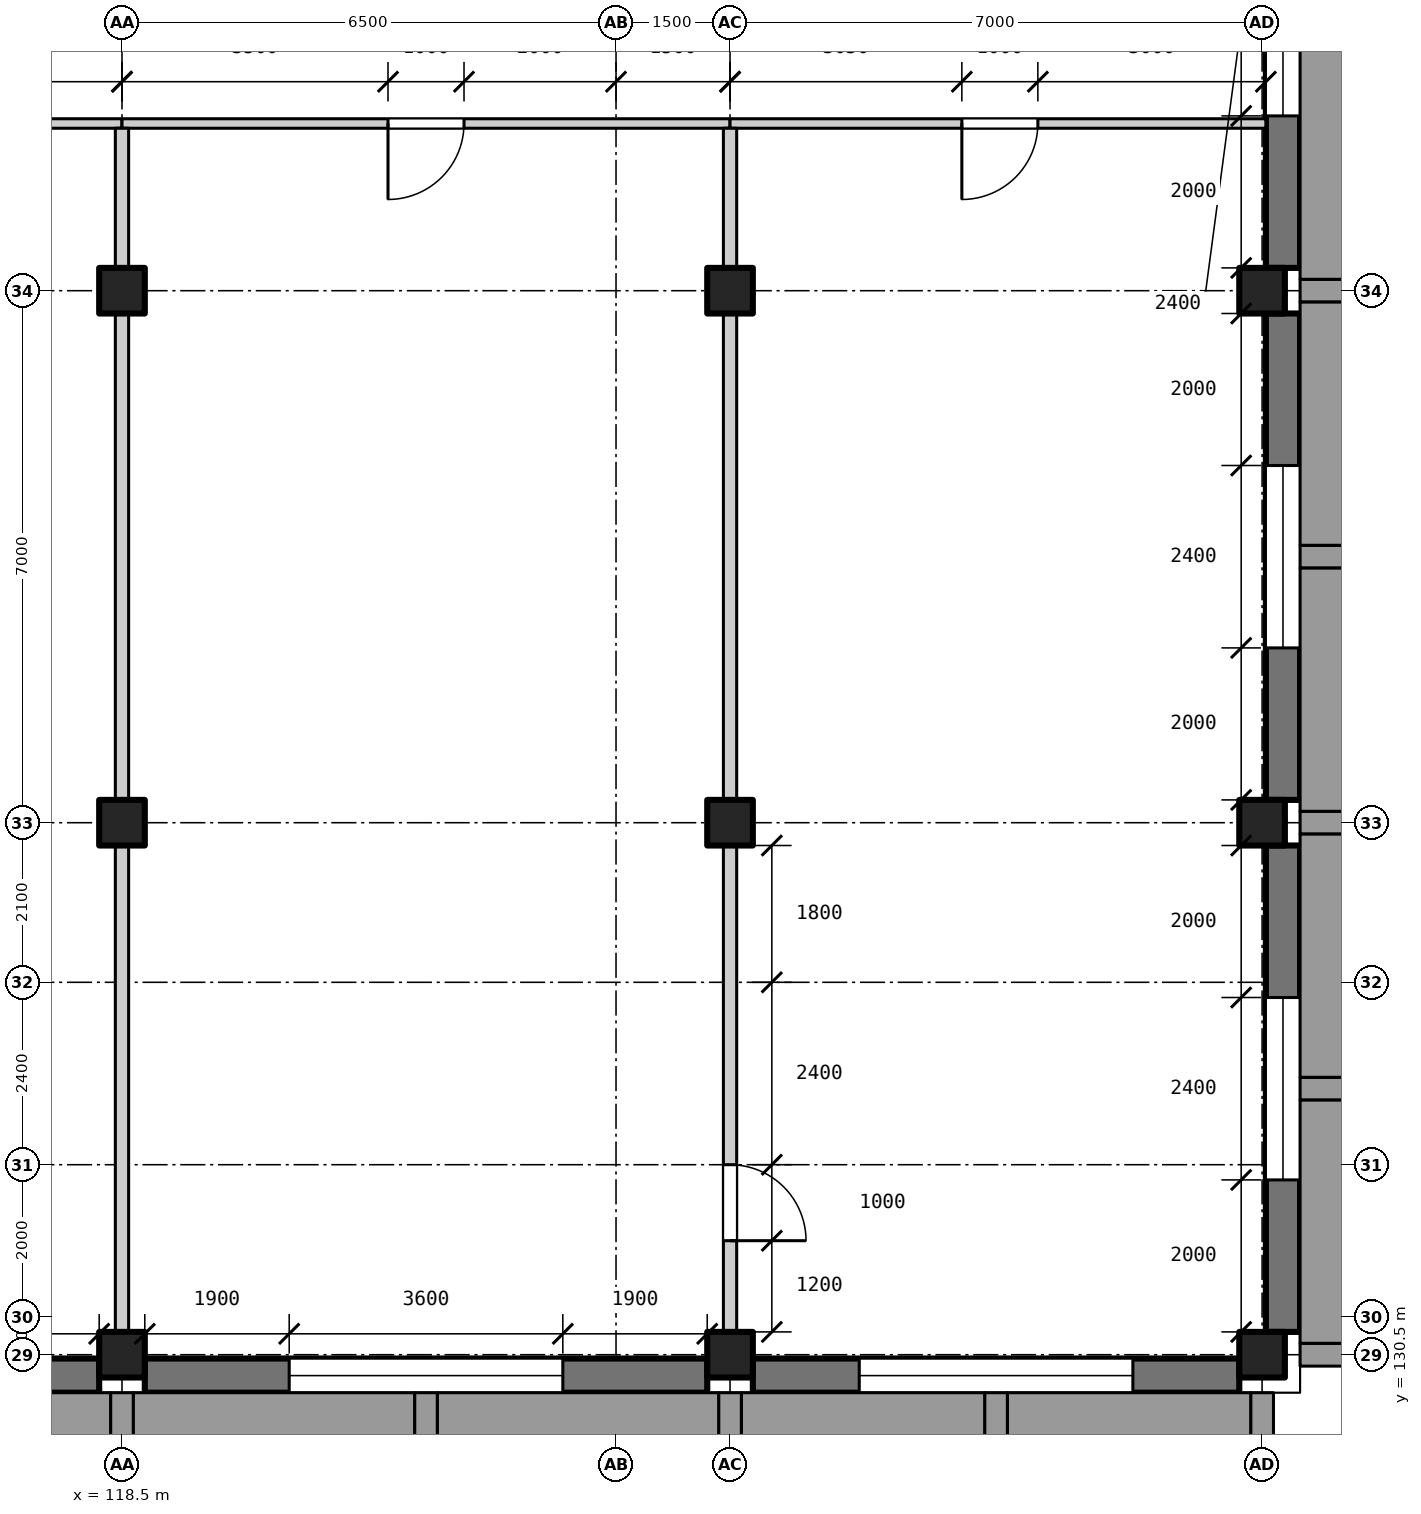
"""IFC4 building model, lengths in metres.
Left out: names, types, materials, properties, quantities, classifications, styles, units other than length and angle.
Written with IfcOpenShell. Run it as: python <this file> out.ifc"""

import sys

from ifc_helpers import new_model, si_unit, direction, frame, frame_2d, origin, origin_2d, place, context, subcontext, project, spatial, rectangle, extrude, element, fill, save


model = new_model("IFC4")
c1 = context("Model", 3, precision=1e-05, world=origin(), true_north=direction((0.0, 1.0)))
c2 = subcontext(c1, "Body", "Model", "MODEL_VIEW")
j1 = project(units=[si_unit("LENGTHUNIT", "METRE"), si_unit("PLANEANGLEUNIT", "RADIAN")], contexts=[c1])
p1 = place(None, origin())
s1 = spatial("IfcSite", under=j1, at=p1, CompositionType="ELEMENT")
p2 = place(p1, origin())
s2 = spatial("IfcBuilding", under=s1, at=p2, CompositionType="ELEMENT")
p3 = place(p2, frame((0.0, 0.0, 14.4)))
s3 = spatial("IfcBuildingStorey", under=s2, at=p3, CompositionType="ELEMENT", Elevation=14.4)
for number, where, z_axis, x_axis in (
    (1, (118.5, 130.5, 0.0), (0.0, 0.0, 1.0), (1.0, 0.0, 0.0)),
    (2, (118.5, 137.5, 0.0), (0.0, 0.0, 1.0), (1.0, 0.0, 0.0)),
    (3, (118.5, 144.5, 0.0), (0.0, 0.0, 1.0), (1.0, 0.0, 0.0)),
    (4, (126.5, 130.5, 0.0), (0.0, 0.0, 1.0), (1.0, 0.0, 0.0)),
    (5, (126.5, 137.5, 0.0), (0.0, 0.0, 1.0), (1.0, 0.0, 0.0)),
    (6, (126.5, 144.5, 0.0), (0.0, 0.0, 1.0), (1.0, 0.0, 0.0)),
    (7, (133.5, 130.5, 0.0), (0.0, 0.0, 1.0), (1.0, 0.0, 0.0)),
    (8, (133.5, 137.5, 0.0), (0.0, 0.0, 1.0), (1.0, 0.0, 0.0)),
    (9, (133.5, 144.5, 0.0), (0.0, 0.0, 1.0), (1.0, 0.0, 0.0)),
):
    element("IfcColumn", number, at=place(p3, frame(where, z_axis=z_axis, x_axis=x_axis)), inside=s3, PredefinedType="COLUMN", context=c2, shape_type="SweptSolid", body=[
        extrude(rectangle(XDim=0.6, YDim=0.6, at=origin_2d()), origin(), (0.0, 0.0, 1.0), 3.9),
    ])
p4 = place(p3, frame((134.0, 130.125, 4.2), z_axis=(0.0, 0.0, 1.0), x_axis=(-1.0, 0.0, 0.0)))
e10 = element("IfcWall", 10, at=p4, inside=s3, PredefinedType="PARAPET", context=c2, shape_type="SweptSolid", body=[
    extrude(rectangle(XDim=48.0, YDim=0.25, at=frame_2d((24.0, 0.0))), origin(), (0.0, 0.0, 1.0), 1.1),
])
p5 = place(p3, frame((133.875, 165.75, 4.2), z_axis=(0.0, 0.0, 1.0), x_axis=(0.0, -1.0, 0.0)))
e11 = element("IfcWall", 11, at=p5, inside=s3, PredefinedType="PARAPET", context=c2, shape_type="SweptSolid", body=[
    extrude(rectangle(XDim=35.5, YDim=0.25, at=frame_2d((17.75, 0.0))), origin(), (0.0, 0.0, 1.0), 1.1),
])
p6 = place(p3, frame((118.2, 130.225, 0.0), z_axis=(0.0, 0.0, 1.0), x_axis=(-1.0, 0.0, 0.0)))
e12 = element("IfcWall", 12, at=p6, inside=s3, PredefinedType="SOLIDWALL", context=c2, shape_type="SweptSolid", body=[
    extrude(rectangle(XDim=7.4, YDim=0.45, at=frame_2d((3.7, 0.0))), origin(), (0.0, 0.0, 1.0), 3.0),
])
p7 = place(p6, frame((1.9, 0.0, 0.9)))
e13 = element("IfcOpeningElement", 13, at=p7, cuts=e12, PredefinedType="OPENING", context=c2, shape_type="SweptSolid", body=[
    extrude(rectangle(XDim=3.6, YDim=1.6, at=frame_2d((1.8, 0.8))), frame((0.0, 0.235, 0.0), z_axis=(0.0, -1.0, 0.0), x_axis=(1.0, 0.0, 0.0)), (0.0, 0.0, 1.0), 0.47),
])
p8 = place(p3, frame((126.2, 130.225, 0.0), z_axis=(0.0, 0.0, 1.0), x_axis=(-1.0, 0.0, 0.0)))
e14 = element("IfcWall", 14, at=p8, inside=s3, PredefinedType="SOLIDWALL", context=c2, shape_type="SweptSolid", body=[
    extrude(rectangle(XDim=7.4, YDim=0.45, at=frame_2d((3.7, 0.0))), origin(), (0.0, 0.0, 1.0), 3.0),
])
p9 = place(p8, frame((1.9, 0.0, 0.9)))
e15 = element("IfcOpeningElement", 15, at=p9, cuts=e14, PredefinedType="OPENING", context=c2, shape_type="SweptSolid", body=[
    extrude(rectangle(XDim=3.6, YDim=1.6, at=frame_2d((1.8, 0.8))), frame((0.0, 0.235, 0.0), z_axis=(0.0, -1.0, 0.0), x_axis=(1.0, 0.0, 0.0)), (0.0, 0.0, 1.0), 0.47),
])
p10 = place(p3, frame((133.2, 130.225, 0.0), z_axis=(0.0, 0.0, 1.0), x_axis=(-1.0, 0.0, 0.0)))
e16 = element("IfcWall", 16, at=p10, inside=s3, PredefinedType="SOLIDWALL", context=c2, shape_type="SweptSolid", body=[
    extrude(rectangle(XDim=6.4, YDim=0.45, at=frame_2d((3.2, 0.0))), origin(), (0.0, 0.0, 1.0), 3.0),
])
p11 = place(p10, frame((1.4, 0.0, 0.9)))
e17 = element("IfcOpeningElement", 17, at=p11, cuts=e16, PredefinedType="OPENING", context=c2, shape_type="SweptSolid", body=[
    extrude(rectangle(XDim=3.6, YDim=1.6, at=frame_2d((1.8, 0.8))), frame((0.0, 0.235, 0.0), z_axis=(0.0, -1.0, 0.0), x_axis=(1.0, 0.0, 0.0)), (0.0, 0.0, 1.0), 0.47),
])
p12 = place(p3, frame((133.775, 137.2, 0.0), z_axis=(0.0, 0.0, 1.0), x_axis=(0.0, -1.0, 0.0)))
e18 = element("IfcWall", 18, at=p12, inside=s3, PredefinedType="SOLIDWALL", context=c2, shape_type="SweptSolid", body=[
    extrude(rectangle(XDim=6.4, YDim=0.45, at=frame_2d((3.2, 0.0))), origin(), (0.0, 0.0, 1.0), 3.1),
])
p13 = place(p12, frame((2.0, 0.0, 0.9)))
e19 = element("IfcOpeningElement", 19, at=p13, cuts=e18, PredefinedType="OPENING", context=c2, shape_type="SweptSolid", body=[
    extrude(rectangle(XDim=2.4, YDim=1.6, at=frame_2d((1.2, 0.8))), frame((0.0, 0.235, 0.0), z_axis=(0.0, -1.0, 0.0), x_axis=(1.0, 0.0, 0.0)), (0.0, 0.0, 1.0), 0.47),
])
p14 = place(p3, frame((133.775, 144.2, 0.0), z_axis=(0.0, 0.0, 1.0), x_axis=(0.0, -1.0, 0.0)))
e20 = element("IfcWall", 20, at=p14, inside=s3, PredefinedType="SOLIDWALL", context=c2, shape_type="SweptSolid", body=[
    extrude(rectangle(XDim=6.4, YDim=0.45, at=frame_2d((3.2, 0.0))), origin(), (0.0, 0.0, 1.0), 3.1),
])
p15 = place(p14, frame((2.0, 0.0, 0.9)))
e21 = element("IfcOpeningElement", 21, at=p15, cuts=e20, PredefinedType="OPENING", context=c2, shape_type="SweptSolid", body=[
    extrude(rectangle(XDim=2.4, YDim=1.6, at=frame_2d((1.2, 0.8))), frame((0.0, 0.235, 0.0), z_axis=(0.0, -1.0, 0.0), x_axis=(1.0, 0.0, 0.0)), (0.0, 0.0, 1.0), 0.47),
])
p16 = place(p3, frame((133.775, 151.2, 0.0), z_axis=(0.0, 0.0, 1.0), x_axis=(0.0, -1.0, 0.0)))
e22 = element("IfcWall", 22, at=p16, inside=s3, PredefinedType="SOLIDWALL", context=c2, shape_type="SweptSolid", body=[
    extrude(rectangle(XDim=6.4, YDim=0.45, at=frame_2d((3.2, 0.0))), origin(), (0.0, 0.0, 1.0), 3.1),
])
p17 = place(p16, frame((2.0, 0.0, 0.9)))
e23 = element("IfcOpeningElement", 23, at=p17, cuts=e22, PredefinedType="OPENING", context=c2, shape_type="SweptSolid", body=[
    extrude(rectangle(XDim=2.4, YDim=1.6, at=frame_2d((1.2, 0.8))), frame((0.0, 0.235, 0.0), z_axis=(0.0, -1.0, 0.0), x_axis=(1.0, 0.0, 0.0)), (0.0, 0.0, 1.0), 0.47),
])
p18 = place(p3, frame((110.5, 146.7, 0.0), z_axis=(0.0, 0.0, 1.0), x_axis=(1.0, 0.0, 0.0)))
e24 = element("IfcWall", 24, at=p18, inside=s3, PredefinedType="PARTITIONING", context=c2, shape_type="SweptSolid", body=[
    extrude(rectangle(XDim=8.0, YDim=0.125, at=frame_2d((4.0, 0.0))), origin(), (0.0, 0.0, 1.0), 3.9),
])
p19 = place(p18, frame((3.5, 0.0, 0.0)))
e25 = element("IfcOpeningElement", 25, at=p19, cuts=e24, PredefinedType="OPENING", context=c2, shape_type="SweptSolid", body=[
    extrude(rectangle(XDim=1.0, YDim=2.1, at=frame_2d((0.5, 1.05))), frame((0.0, 0.073, 0.0), z_axis=(0.0, -1.0, 0.0), x_axis=(1.0, 0.0, 0.0)), (0.0, 0.0, 1.0), 0.145),
])
p20 = place(p3, frame((118.5, 146.7, 0.0), z_axis=(0.0, 0.0, 1.0), x_axis=(1.0, 0.0, 0.0)))
e26 = element("IfcWall", 26, at=p20, inside=s3, PredefinedType="PARTITIONING", context=c2, shape_type="SweptSolid", body=[
    extrude(rectangle(XDim=8.0, YDim=0.125, at=frame_2d((4.0, 0.0))), origin(), (0.0, 0.0, 1.0), 3.9),
])
p21 = place(p20, frame((3.5, 0.0, 0.0)))
e27 = element("IfcOpeningElement", 27, at=p21, cuts=e26, PredefinedType="OPENING", context=c2, shape_type="SweptSolid", body=[
    extrude(rectangle(XDim=1.0, YDim=2.1, at=frame_2d((0.5, 1.05))), frame((0.0, 0.073, 0.0), z_axis=(0.0, -1.0, 0.0), x_axis=(1.0, 0.0, 0.0)), (0.0, 0.0, 1.0), 0.145),
])
p22 = place(p3, frame((126.5, 146.7, 0.0), z_axis=(0.0, 0.0, 1.0), x_axis=(1.0, 0.0, 0.0)))
e28 = element("IfcWall", 28, at=p22, inside=s3, PredefinedType="PARTITIONING", context=c2, shape_type="SweptSolid", body=[
    extrude(rectangle(XDim=7.05, YDim=0.125, at=frame_2d((3.525, 0.0))), origin(), (0.0, 0.0, 1.0), 3.9),
])
p23 = place(p22, frame((3.05, 0.0, 0.0)))
e29 = element("IfcOpeningElement", 29, at=p23, cuts=e28, PredefinedType="OPENING", context=c2, shape_type="SweptSolid", body=[
    extrude(rectangle(XDim=1.0, YDim=2.1, at=frame_2d((0.5, 1.05))), frame((0.0, 0.073, 0.0), z_axis=(0.0, -1.0, 0.0), x_axis=(1.0, 0.0, 0.0)), (0.0, 0.0, 1.0), 0.145),
])
for number, where, z_axis, x_axis in (
    (30, (118.5, 130.8, 0.0), (0.0, 0.0, 1.0), (0.0, 1.0, 0.0)),
    (31, (118.5, 137.8, 0.0), (0.0, 0.0, 1.0), (0.0, 1.0, 0.0)),
):
    element("IfcWall", number, at=place(p3, frame(where, z_axis=z_axis, x_axis=x_axis)), inside=s3, PredefinedType="PARTITIONING", context=c2, shape_type="SweptSolid", body=[
        extrude(rectangle(XDim=6.4, YDim=0.175, at=frame_2d((3.2, 0.0))), origin(), (0.0, 0.0, 1.0), 3.1),
    ])
p24 = place(p3, frame((118.5, 144.8, 0.0), z_axis=(0.0, 0.0, 1.0), x_axis=(0.0, 1.0, 0.0)))
e32 = element("IfcWall", 32, at=p24, inside=s3, PredefinedType="PARTITIONING", context=c2, shape_type="SweptSolid", body=[
    extrude(rectangle(XDim=1.837, YDim=0.175, at=frame_2d((0.919, 0.0))), origin(), (0.0, 0.0, 1.0), 3.1),
])
p25 = place(p3, frame((126.5, 130.8, 0.0), z_axis=(0.0, 0.0, 1.0), x_axis=(0.0, 1.0, 0.0)))
e33 = element("IfcWall", 33, at=p25, inside=s3, PredefinedType="PARTITIONING", context=c2, shape_type="SweptSolid", body=[
    extrude(rectangle(XDim=6.4, YDim=0.175, at=frame_2d((3.2, 0.0))), origin(), (0.0, 0.0, 1.0), 3.1),
])
p26 = place(p25, frame((1.2, 0.0, 0.0)))
e34 = element("IfcOpeningElement", 34, at=p26, cuts=e33, PredefinedType="OPENING", context=c2, shape_type="SweptSolid", body=[
    extrude(rectangle(XDim=1.0, YDim=2.1, at=frame_2d((0.5, 1.05))), frame((0.0, 0.097, 0.0), z_axis=(0.0, -1.0, 0.0), x_axis=(1.0, 0.0, 0.0)), (0.0, 0.0, 1.0), 0.195),
])
p27 = place(p3, frame((126.5, 137.8, 0.0), z_axis=(0.0, 0.0, 1.0), x_axis=(0.0, 1.0, 0.0)))
e35 = element("IfcWall", 35, at=p27, inside=s3, PredefinedType="PARTITIONING", context=c2, shape_type="SweptSolid", body=[
    extrude(rectangle(XDim=6.4, YDim=0.175, at=frame_2d((3.2, 0.0))), origin(), (0.0, 0.0, 1.0), 3.1),
])
p28 = place(p3, frame((126.5, 144.8, 0.0), z_axis=(0.0, 0.0, 1.0), x_axis=(0.0, 1.0, 0.0)))
e36 = element("IfcWall", 36, at=p28, inside=s3, PredefinedType="PARTITIONING", context=c2, shape_type="SweptSolid", body=[
    extrude(rectangle(XDim=1.837, YDim=0.175, at=frame_2d((0.919, 0.0))), origin(), (0.0, 0.0, 1.0), 3.1),
])
p29 = place(p9, origin())
e37 = element("IfcWindow", 37, at=p29, inside=s3, PartitioningType="SINGLE_PANEL", PredefinedType="WINDOW", context=c2, shape_type="SweptSolid", body=[
    extrude(rectangle(XDim=3.6, YDim=1.6, at=frame_2d((1.8, 0.8))), frame((0.0, -0.125, 0.0), z_axis=(0.0, -1.0, 0.0), x_axis=(1.0, 0.0, 0.0)), (0.0, 0.0, 1.0), 0.06),
])
fill(e15, e37)
p30 = place(p11, origin())
e38 = element("IfcWindow", 38, at=p30, inside=s3, PartitioningType="SINGLE_PANEL", PredefinedType="WINDOW", context=c2, shape_type="SweptSolid", body=[
    extrude(rectangle(XDim=3.6, YDim=1.6, at=frame_2d((1.8, 0.8))), frame((0.0, -0.125, 0.0), z_axis=(0.0, -1.0, 0.0), x_axis=(1.0, 0.0, 0.0)), (0.0, 0.0, 1.0), 0.06),
])
fill(e17, e38)
p31 = place(p13, origin())
e39 = element("IfcWindow", 39, at=p31, inside=s3, PartitioningType="SINGLE_PANEL", PredefinedType="WINDOW", context=c2, shape_type="SweptSolid", body=[
    extrude(rectangle(XDim=2.4, YDim=1.6, at=frame_2d((1.2, 0.8))), frame((0.0, -0.125, 0.0), z_axis=(0.0, -1.0, 0.0), x_axis=(1.0, 0.0, 0.0)), (0.0, 0.0, 1.0), 0.06),
])
fill(e19, e39)
p32 = place(p15, origin())
e40 = element("IfcWindow", 40, at=p32, inside=s3, PartitioningType="SINGLE_PANEL", PredefinedType="WINDOW", context=c2, shape_type="SweptSolid", body=[
    extrude(rectangle(XDim=2.4, YDim=1.6, at=frame_2d((1.2, 0.8))), frame((0.0, -0.125, 0.0), z_axis=(0.0, -1.0, 0.0), x_axis=(1.0, 0.0, 0.0)), (0.0, 0.0, 1.0), 0.06),
])
fill(e21, e40)
p33 = place(p17, origin())
e41 = element("IfcWindow", 41, at=p33, inside=s3, PartitioningType="SINGLE_PANEL", PredefinedType="WINDOW", context=c2, shape_type="SweptSolid", body=[
    extrude(rectangle(XDim=2.4, YDim=1.6, at=frame_2d((1.2, 0.8))), frame((0.0, -0.125, 0.0), z_axis=(0.0, -1.0, 0.0), x_axis=(1.0, 0.0, 0.0)), (0.0, 0.0, 1.0), 0.06),
])
fill(e23, e41)
p34 = place(p26, frame((1.0, 0.0, 0.0), z_axis=(0.0, 0.0, 1.0), x_axis=(-1.0, 0.0, 0.0)))
e42 = element("IfcDoor", 42, at=p34, inside=s3, OperationType="SINGLE_SWING_RIGHT", PredefinedType="DOOR", context=c2, shape_type="SweptSolid", body=[
    extrude(rectangle(XDim=1.0, YDim=2.1, at=frame_2d((0.5, 1.05))), frame((0.0, 0.025, 0.0), z_axis=(0.0, -1.0, 0.0), x_axis=(1.0, 0.0, 0.0)), (0.0, 0.0, 1.0), 0.05),
])
fill(e34, e42)
p35 = place(p21, frame((1.0, 0.0, 0.0), z_axis=(0.0, 0.0, 1.0), x_axis=(-1.0, 0.0, 0.0)))
e43 = element("IfcDoor", 43, at=p35, inside=s3, OperationType="SINGLE_SWING_RIGHT", PredefinedType="DOOR", context=c2, shape_type="SweptSolid", body=[
    extrude(rectangle(XDim=1.0, YDim=2.1, at=frame_2d((0.5, 1.05))), frame((0.0, 0.025, 0.0), z_axis=(0.0, -1.0, 0.0), x_axis=(1.0, 0.0, 0.0)), (0.0, 0.0, 1.0), 0.05),
])
fill(e27, e43)
p36 = place(p23, frame((1.0, 0.0, 0.0), z_axis=(0.0, 0.0, 1.0), x_axis=(-1.0, 0.0, 0.0)))
e44 = element("IfcDoor", 44, at=p36, inside=s3, OperationType="SINGLE_SWING_RIGHT", PredefinedType="DOOR", context=c2, shape_type="SweptSolid", body=[
    extrude(rectangle(XDim=1.0, YDim=2.1, at=frame_2d((0.5, 1.05))), frame((0.0, 0.025, 0.0), z_axis=(0.0, -1.0, 0.0), x_axis=(1.0, 0.0, 0.0)), (0.0, 0.0, 1.0), 0.05),
])
fill(e29, e44)
save(model, sys.argv[1])
